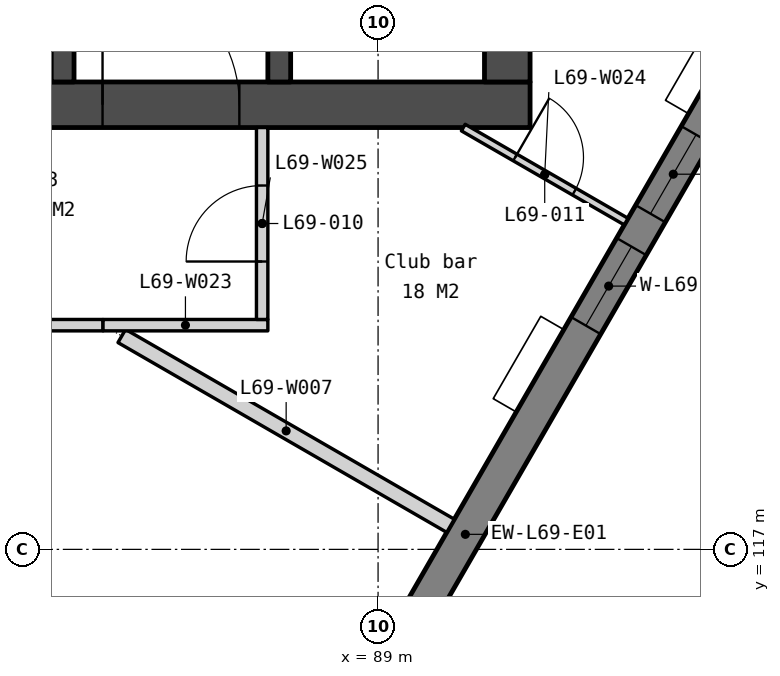
"""IFC4 building model, lengths in metres.
Left out: names, types, materials, properties, quantities, classifications, styles, units other than length and angle.
Written with IfcOpenShell. Run it as: python <this file> out.ifc"""

import sys

from ifc_helpers import new_model, si_unit, direction, frame, frame_2d, origin, place, context, subcontext, project, spatial, polyline, rectangle, outline, extrude, element, fill, save


model = new_model("IFC4")
c1 = context("Model", 3, precision=1e-05, world=origin(), true_north=direction((0.0, 1.0)))
c2 = subcontext(c1, "Body", "Model", "MODEL_VIEW")
j1 = project(units=[si_unit("LENGTHUNIT", "METRE"), si_unit("PLANEANGLEUNIT", "RADIAN")], contexts=[c1])
p1 = place(None, origin())
s1 = spatial("IfcSite", under=j1, at=p1, CompositionType="ELEMENT")
p2 = place(p1, origin())
s2 = spatial("IfcBuilding", under=s1, at=p2, CompositionType="ELEMENT")
p3 = place(p2, frame((0.0, 0.0, 281.6)))
s3 = spatial("IfcBuildingStorey", under=s2, at=p3, CompositionType="ELEMENT", Elevation=281.6)
p4 = place(p3, frame((69.0, 122.85, 0.0), z_axis=(0.0, 0.0, 1.0), x_axis=(1.0, 0.0, 0.0)))
e1 = element("IfcWall", 1, at=p4, inside=s3, PredefinedType="SOLIDWALL", context=c2, shape_type="SweptSolid", body=[
    extrude(rectangle(XDim=22.0, YDim=0.6, at=frame_2d((11.0, 0.0))), origin(), (0.0, 0.0, 1.0), 3.5),
])
p5 = place(p4, frame((16.375, 0.0, 0.0)))
e2 = element("IfcOpeningElement", 2, at=p5, cuts=e1, PredefinedType="OPENING", context=c2, shape_type="SweptSolid", body=[
    extrude(rectangle(XDim=1.8, YDim=2.1, at=frame_2d((0.9, 1.05))), frame((0.0, 0.31, 0.0), z_axis=(0.0, -1.0, 0.0), x_axis=(1.0, 0.0, 0.0)), (0.0, 0.0, 1.0), 0.62),
])
p6 = place(p4, frame((3.825, 0.0, 0.0)))
e3 = element("IfcOpeningElement", 3, at=p6, cuts=e1, PredefinedType="OPENING", context=c2, shape_type="SweptSolid", body=[
    extrude(rectangle(XDim=1.8, YDim=2.1, at=frame_2d((0.9, 1.05))), frame((0.0, 0.31, 0.0), z_axis=(0.0, -1.0, 0.0), x_axis=(1.0, 0.0, 0.0)), (0.0, 0.0, 1.0), 0.62),
])
p7 = place(p4, frame((12.85, 0.0, 0.0)))
e4 = element("IfcOpeningElement", 4, at=p7, cuts=e1, PredefinedType="OPENING", context=c2, shape_type="SweptSolid", body=[
    extrude(rectangle(XDim=1.5, YDim=2.1, at=frame_2d((0.75, 1.05))), frame((0.0, 0.31, 0.0), z_axis=(0.0, -1.0, 0.0), x_axis=(1.0, 0.0, 0.0)), (0.0, 0.0, 1.0), 0.62),
])
p8 = place(p3, frame((84.85, 125.85, 0.0), z_axis=(0.0, 0.0, 1.0), x_axis=(0.0, -1.0, 0.0)))
e5 = element("IfcWall", 5, at=p8, inside=s3, PredefinedType="SOLIDWALL", context=c2, shape_type="SweptSolid", body=[
    extrude(rectangle(XDim=2.7, YDim=0.3, at=frame_2d((1.35, 0.0))), origin(), (0.0, 0.0, 1.0), 3.5),
])
p9 = place(p3, frame((87.7, 133.95, 0.0), z_axis=(0.0, 0.0, 1.0), x_axis=(0.0, -1.0, 0.0)))
e6 = element("IfcWall", 6, at=p9, inside=s3, PredefinedType="SOLIDWALL", context=c2, shape_type="SweptSolid", body=[
    extrude(rectangle(XDim=10.8, YDim=0.3, at=frame_2d((5.4, 0.0))), origin(), (0.0, 0.0, 1.0), 3.5),
])
p10 = place(p9, frame((6.95, 0.0, 0.0)))
e7 = element("IfcOpeningElement", 7, at=p10, cuts=e6, PredefinedType="OPENING", context=c2, shape_type="SweptSolid", body=[
    extrude(rectangle(XDim=1.1, YDim=2.1, at=frame_2d((0.55, 1.05))), frame((0.0, 0.16, 0.0), z_axis=(0.0, -1.0, 0.0), x_axis=(1.0, 0.0, 0.0)), (0.0, 0.0, 1.0), 0.32),
])
p11 = place(p9, frame((5.1, 0.0, 0.0)))
e8 = element("IfcOpeningElement", 8, at=p11, cuts=e6, PredefinedType="OPENING", context=c2, shape_type="SweptSolid", body=[
    extrude(rectangle(XDim=1.0, YDim=2.1, at=frame_2d((0.5, 1.05))), frame((0.0, 0.16, 0.0), z_axis=(0.0, -1.0, 0.0), x_axis=(1.0, 0.0, 0.0)), (0.0, 0.0, 1.0), 0.32),
])
p12 = place(p9, frame((9.25, 0.0, 0.0)))
e9 = element("IfcOpeningElement", 9, at=p12, cuts=e6, PredefinedType="OPENING", context=c2, shape_type="SweptSolid", body=[
    extrude(rectangle(XDim=1.1, YDim=2.1, at=frame_2d((0.55, 1.05))), frame((0.0, 0.16, 0.0), z_axis=(0.0, -1.0, 0.0), x_axis=(1.0, 0.0, 0.0)), (0.0, 0.0, 1.0), 0.32),
])
p13 = place(p3, frame((90.7, 133.95, 0.0), z_axis=(0.0, 0.0, 1.0), x_axis=(0.0, -1.0, 0.0)))
e10 = element("IfcWall", 10, at=p13, inside=s3, PredefinedType="SOLIDWALL", context=c2, shape_type="SweptSolid", body=[
    extrude(rectangle(XDim=10.8, YDim=0.6, at=frame_2d((5.4, 0.0))), origin(), (0.0, 0.0, 1.0), 3.5),
])
p14 = place(p3, frame((80.905, 101.188, -0.15), z_axis=(0.0, 0.0, 1.0), x_axis=(0.500002536638, 0.866023939251, 0.0)))
e11 = element("IfcWall", 11, at=p14, inside=s3, PredefinedType="SOLIDWALL", context=c2, shape_type="SweptSolid", body=[
    extrude(outline(polyline([(36.972, 0.0), (36.972, 3.55), (0.0, 3.55), (0.0, 0.0), (36.972, 0.0)])), frame((0.0, 0.225, 0.0), z_axis=(0.0, -1.0, 0.0), x_axis=(1.0, 0.0, 0.0)), (0.0, 0.0, 1.0), 0.45),
])
p15 = place(p14, frame((3.172, 0.0, 0.95)))
e12 = element("IfcOpeningElement", 12, at=p15, cuts=e11, PredefinedType="OPENING", context=c2, shape_type="SweptSolid", body=[
    extrude(rectangle(XDim=1.2, YDim=2.2, at=frame_2d((0.6, 1.1))), frame((0.0, 0.235, 0.0), z_axis=(0.0, -1.0, 0.0), x_axis=(1.0, 0.0, 0.0)), (0.0, 0.0, 1.0), 0.47),
])
p16 = place(p14, frame((4.872, 0.0, 0.95)))
e13 = element("IfcOpeningElement", 13, at=p16, cuts=e11, PredefinedType="OPENING", context=c2, shape_type="SweptSolid", body=[
    extrude(rectangle(XDim=1.2, YDim=2.2, at=frame_2d((0.6, 1.1))), frame((0.0, 0.235, 0.0), z_axis=(0.0, -1.0, 0.0), x_axis=(1.0, 0.0, 0.0)), (0.0, 0.0, 1.0), 0.47),
])
p17 = place(p14, frame((12.415, 0.0, 0.95)))
e14 = element("IfcOpeningElement", 14, at=p17, cuts=e11, PredefinedType="OPENING", context=c2, shape_type="SweptSolid", body=[
    extrude(rectangle(XDim=1.2, YDim=2.2, at=frame_2d((0.6, 1.1))), frame((0.0, 0.235, 0.0), z_axis=(0.0, -1.0, 0.0), x_axis=(1.0, 0.0, 0.0)), (0.0, 0.0, 1.0), 0.47),
])
p18 = place(p14, frame((14.115, 0.0, 0.95)))
e15 = element("IfcOpeningElement", 15, at=p18, cuts=e11, PredefinedType="OPENING", context=c2, shape_type="SweptSolid", body=[
    extrude(rectangle(XDim=1.2, YDim=2.2, at=frame_2d((0.6, 1.1))), frame((0.0, 0.235, 0.0), z_axis=(0.0, -1.0, 0.0), x_axis=(1.0, 0.0, 0.0)), (0.0, 0.0, 1.0), 0.47),
])
p19 = place(p14, frame((21.658, 0.0, 0.95)))
e16 = element("IfcOpeningElement", 16, at=p19, cuts=e11, PredefinedType="OPENING", context=c2, shape_type="SweptSolid", body=[
    extrude(rectangle(XDim=1.2, YDim=2.2, at=frame_2d((0.6, 1.1))), frame((0.0, 0.235, 0.0), z_axis=(0.0, -1.0, 0.0), x_axis=(1.0, 0.0, 0.0)), (0.0, 0.0, 1.0), 0.47),
])
p20 = place(p14, frame((23.358, 0.0, 0.95)))
e17 = element("IfcOpeningElement", 17, at=p20, cuts=e11, PredefinedType="OPENING", context=c2, shape_type="SweptSolid", body=[
    extrude(rectangle(XDim=1.2, YDim=2.2, at=frame_2d((0.6, 1.1))), frame((0.0, 0.235, 0.0), z_axis=(0.0, -1.0, 0.0), x_axis=(1.0, 0.0, 0.0)), (0.0, 0.0, 1.0), 0.47),
])
p21 = place(p14, frame((30.901, 0.0, 0.95)))
e18 = element("IfcOpeningElement", 18, at=p21, cuts=e11, PredefinedType="OPENING", context=c2, shape_type="SweptSolid", body=[
    extrude(rectangle(XDim=1.2, YDim=2.2, at=frame_2d((0.6, 1.1))), frame((0.0, 0.235, 0.0), z_axis=(0.0, -1.0, 0.0), x_axis=(1.0, 0.0, 0.0)), (0.0, 0.0, 1.0), 0.47),
])
p22 = place(p14, frame((32.601, 0.0, 0.95)))
e19 = element("IfcOpeningElement", 19, at=p22, cuts=e11, PredefinedType="OPENING", context=c2, shape_type="SweptSolid", body=[
    extrude(rectangle(XDim=1.2, YDim=2.2, at=frame_2d((0.6, 1.1))), frame((0.0, 0.235, 0.0), z_axis=(0.0, -1.0, 0.0), x_axis=(1.0, 0.0, 0.0)), (0.0, 0.0, 1.0), 0.47),
])
p23 = place(p3, frame((85.628, 119.808, 0.0), z_axis=(0.0, 0.0, 1.0), x_axis=(0.86602359872, -0.50000312645, 0.0)))
e20 = element("IfcWall", 20, at=p23, inside=s3, PredefinedType="PARTITIONING", context=c2, shape_type="SweptSolid", body=[
    extrude(rectangle(XDim=4.995, YDim=0.2, at=frame_2d((2.497, 0.0))), origin(), (0.0, 0.0, 1.0), 3.5),
])
p24 = place(p3, frame((80.075, 117.677, 0.0), z_axis=(0.0, 0.0, 1.0), x_axis=(0.866026931682, -0.499997353595, 0.0)))
e21 = element("IfcWall", 21, at=p24, inside=s3, PredefinedType="PARTITIONING", context=c2, shape_type="SweptSolid", body=[
    extrude(rectangle(XDim=8.738, YDim=0.1, at=frame_2d((4.369, 0.0))), origin(), (0.0, 0.0, 1.0), 3.5),
])
p25 = place(p24, frame((3.869, 0.0, 0.0)))
e22 = element("IfcOpeningElement", 22, at=p25, cuts=e21, PredefinedType="OPENING", context=c2, shape_type="SweptSolid", body=[
    extrude(rectangle(XDim=1.0, YDim=2.1, at=frame_2d((0.5, 1.05))), frame((0.0, 0.06, 0.0), z_axis=(0.0, -1.0, 0.0), x_axis=(1.0, 0.0, 0.0)), (0.0, 0.0, 1.0), 0.12),
])
p26 = place(p3, frame((78.8, 119.95, 0.0), z_axis=(0.0, 0.0, 1.0), x_axis=(1.0, 0.0, 0.0)))
e23 = element("IfcWall", 23, at=p26, inside=s3, PredefinedType="PARTITIONING", context=c2, shape_type="SweptSolid", body=[
    extrude(rectangle(XDim=6.581, YDim=0.15, at=frame_2d((3.291, 0.0))), origin(), (0.0, 0.0, 1.0), 3.5),
])
p27 = place(p26, frame((2.791, 0.0, 0.0)))
e24 = element("IfcOpeningElement", 24, at=p27, cuts=e23, PredefinedType="OPENING", context=c2, shape_type="SweptSolid", body=[
    extrude(rectangle(XDim=1.0, YDim=2.1, at=frame_2d((0.5, 1.05))), frame((0.0, 0.085, 0.0), z_axis=(0.0, -1.0, 0.0), x_axis=(1.0, 0.0, 0.0)), (0.0, 0.0, 1.0), 0.17),
])
p28 = place(p3, frame((85.381, 119.95, 0.0), z_axis=(0.0, 0.0, 1.0), x_axis=(1.0, 0.0, 0.0)))
e25 = element("IfcWall", 25, at=p28, inside=s3, PredefinedType="PARTITIONING", context=c2, shape_type="SweptSolid", body=[
    extrude(rectangle(XDim=2.169, YDim=0.15, at=frame_2d((1.084, 0.0))), origin(), (0.0, 0.0, 1.0), 3.5),
])
p29 = place(p3, frame((90.121, 122.55, 0.0), z_axis=(0.0, 0.0, 1.0), x_axis=(0.86604923931, -0.499958713387, 0.0)))
e26 = element("IfcWall", 26, at=p29, inside=s3, PredefinedType="PARTITIONING", context=c2, shape_type="SweptSolid", body=[
    extrude(rectangle(XDim=2.475, YDim=0.1, at=frame_2d((1.237, 0.0))), origin(), (0.0, 0.0, 1.0), 3.5),
])
p30 = place(p29, frame((0.787, 0.0, 0.0)))
e27 = element("IfcOpeningElement", 27, at=p30, cuts=e26, PredefinedType="OPENING", context=c2, shape_type="SweptSolid", body=[
    extrude(rectangle(XDim=0.9, YDim=2.1, at=frame_2d((0.45, 1.05))), frame((0.0, 0.06, 0.0), z_axis=(0.0, -1.0, 0.0), x_axis=(1.0, 0.0, 0.0)), (0.0, 0.0, 1.0), 0.12),
])
p31 = place(p3, frame((87.475, 120.025, 0.0), z_axis=(0.0, 0.0, 1.0), x_axis=(0.0, 1.0, 0.0)))
e28 = element("IfcWall", 28, at=p31, inside=s3, PredefinedType="PARTITIONING", context=c2, shape_type="SweptSolid", body=[
    extrude(rectangle(XDim=2.525, YDim=0.15, at=frame_2d((1.263, 0.0))), origin(), (0.0, 0.0, 1.0), 3.5),
])
p32 = place(p31, frame((0.762, 0.0, 0.0)))
e29 = element("IfcOpeningElement", 29, at=p32, cuts=e28, PredefinedType="OPENING", context=c2, shape_type="SweptSolid", body=[
    extrude(rectangle(XDim=1.0, YDim=2.1, at=frame_2d((0.5, 1.05))), frame((0.0, 0.085, 0.0), z_axis=(0.0, -1.0, 0.0), x_axis=(1.0, 0.0, 0.0)), (0.0, 0.0, 1.0), 0.17),
])
p33 = place(p5, origin())
e30 = element("IfcDoor", 30, at=p33, inside=s3, OperationType="DOUBLE_DOOR_DOUBLE_SWING", PredefinedType="DOOR", context=c2, shape_type="SweptSolid", body=[
    extrude(rectangle(XDim=1.8, YDim=2.1, at=frame_2d((0.9, 1.05))), frame((0.0, 0.025, 0.0), z_axis=(0.0, -1.0, 0.0), x_axis=(1.0, 0.0, 0.0)), (0.0, 0.0, 1.0), 0.05),
])
fill(e2, e30)
p34 = place(p19, origin())
e31 = element("IfcWindow", 31, at=p34, inside=s3, PartitioningType="SINGLE_PANEL", PredefinedType="WINDOW", context=c2, shape_type="SweptSolid", body=[
    extrude(rectangle(XDim=1.2, YDim=2.2, at=frame_2d((0.6, 1.1))), frame((0.0, 0.03, 0.0), z_axis=(0.0, -1.0, 0.0), x_axis=(1.0, 0.0, 0.0)), (0.0, 0.0, 1.0), 0.06),
])
fill(e16, e31)
p35 = place(p20, origin())
e32 = element("IfcWindow", 32, at=p35, inside=s3, PartitioningType="SINGLE_PANEL", PredefinedType="WINDOW", context=c2, shape_type="SweptSolid", body=[
    extrude(rectangle(XDim=1.2, YDim=2.2, at=frame_2d((0.6, 1.1))), frame((0.0, 0.03, 0.0), z_axis=(0.0, -1.0, 0.0), x_axis=(1.0, 0.0, 0.0)), (0.0, 0.0, 1.0), 0.06),
])
fill(e17, e32)
p36 = place(p32, origin())
e33 = element("IfcDoor", 33, at=p36, inside=s3, OperationType="SINGLE_SWING_LEFT", PredefinedType="DOOR", context=c2, shape_type="SweptSolid", body=[
    extrude(rectangle(XDim=1.0, YDim=2.1, at=frame_2d((0.5, 1.05))), frame((0.0, 0.025, 0.0), z_axis=(0.0, -1.0, 0.0), x_axis=(1.0, 0.0, 0.0)), (0.0, 0.0, 1.0), 0.05),
])
fill(e29, e33)
p37 = place(p30, origin())
e34 = element("IfcDoor", 34, at=p37, inside=s3, OperationType="SINGLE_SWING_LEFT", PredefinedType="DOOR", context=c2, shape_type="SweptSolid", body=[
    extrude(rectangle(XDim=0.9, YDim=2.1, at=frame_2d((0.45, 1.05))), frame((0.0, 0.025, 0.0), z_axis=(0.0, -1.0, 0.0), x_axis=(1.0, 0.0, 0.0)), (0.0, 0.0, 1.0), 0.05),
])
fill(e27, e34)
save(model, sys.argv[1])
